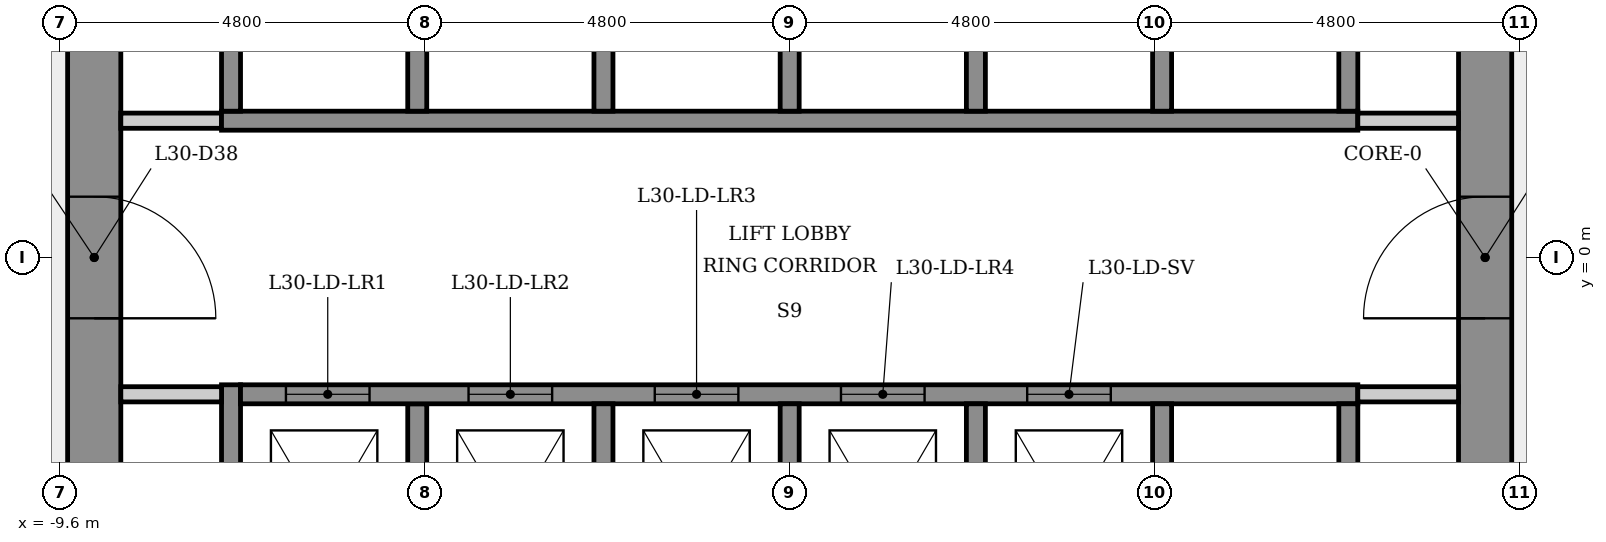
"""IFC4 building model, lengths in metres.
Left out: names, types, materials, properties, quantities, classifications, styles, units other than length and angle.
Written with IfcOpenShell. Run it as: python <this file> out.ifc"""

import sys

from ifc_helpers import new_model, si_unit, direction, frame, frame_2d, origin, place, context, subcontext, project, spatial, rectangle, extrude, element, fill, save


model = new_model("IFC4")
c1 = context("Model", 3, precision=1e-05, world=origin(), true_north=direction((0.0, 1.0)))
c2 = subcontext(c1, "Body", "Model", "MODEL_VIEW")
j1 = project(units=[si_unit("LENGTHUNIT", "METRE"), si_unit("PLANEANGLEUNIT", "RADIAN")], contexts=[c1])
p1 = place(None, origin())
s1 = spatial("IfcSite", under=j1, at=p1, CompositionType="ELEMENT")
p2 = place(p1, origin())
s2 = spatial("IfcBuilding", under=s1, at=p2, CompositionType="ELEMENT")
p3 = place(p2, frame((0.0, 0.0, 113.7)))
s3 = spatial("IfcBuildingStorey", under=s2, at=p3, CompositionType="ELEMENT", Elevation=113.7)
p4 = place(p3, frame((9.15, -5.485, 0.0), z_axis=(0.0, 0.0, 1.0), x_axis=(0.0, 1.0, 0.0)))
e1 = element("IfcWall", 1, at=p4, inside=s3, PredefinedType="SHEAR", context=c2, shape_type="SweptSolid", body=[
    extrude(rectangle(XDim=10.97, YDim=0.7, at=frame_2d((5.485, 0.0))), origin(), (0.0, 0.0, 1.0), 3.4),
])
p5 = place(p4, frame((4.685, 0.0, 0.0)))
e2 = element("IfcOpeningElement", 2, at=p5, cuts=e1, PredefinedType="OPENING", context=c2, shape_type="SweptSolid", body=[
    extrude(rectangle(XDim=1.6, YDim=2.1, at=frame_2d((0.8, 1.05))), frame((0.0, 0.36, 0.0), z_axis=(0.0, -1.0, 0.0), x_axis=(1.0, 0.0, 0.0)), (0.0, 0.0, 1.0), 0.72),
])
p6 = place(p3, frame((-9.15, 5.485, 0.0), z_axis=(0.0, 0.0, 1.0), x_axis=(0.0, -1.0, 0.0)))
e3 = element("IfcWall", 3, at=p6, inside=s3, PredefinedType="SHEAR", context=c2, shape_type="SweptSolid", body=[
    extrude(rectangle(XDim=10.97, YDim=0.7, at=frame_2d((5.485, 0.0))), origin(), (0.0, 0.0, 1.0), 3.4),
])
p7 = place(p6, frame((4.685, 0.0, 0.0)))
e4 = element("IfcOpeningElement", 4, at=p7, cuts=e3, PredefinedType="OPENING", context=c2, shape_type="SweptSolid", body=[
    extrude(rectangle(XDim=1.6, YDim=2.1, at=frame_2d((0.8, 1.05))), frame((0.0, 0.36, 0.0), z_axis=(0.0, -1.0, 0.0), x_axis=(1.0, 0.0, 0.0)), (0.0, 0.0, 1.0), 0.72),
])
p8 = place(p3, frame((-8.8, 1.8, 0.0), z_axis=(0.0, 0.0, 1.0), x_axis=(1.0, 0.0, 0.0)))
e5 = element("IfcWall", 5, at=p8, inside=s3, PredefinedType="PARTITIONING", context=c2, shape_type="SweptSolid", body=[
    extrude(rectangle(XDim=1.325, YDim=0.2, at=frame_2d((0.663, 0.0))), origin(), (0.0, 0.0, 1.0), 3.05),
])
p9 = place(p3, frame((-7.475, 1.8, 0.0), z_axis=(0.0, 0.0, 1.0), x_axis=(1.0, 0.0, 0.0)))
e6 = element("IfcWall", 6, at=p9, inside=s3, PredefinedType="SHEAR", context=c2, shape_type="SweptSolid", body=[
    extrude(rectangle(XDim=14.95, YDim=0.25, at=frame_2d((7.475, 0.0))), origin(), (0.0, 0.0, 1.0), 3.05),
])
p10 = place(p3, frame((-7.35, -5.846, 0.0), z_axis=(0.0, 0.0, 1.0), x_axis=(0.0, 1.0, 0.0)))
e7 = element("IfcWall", 7, at=p10, inside=s3, PredefinedType="SHEAR", context=c2, shape_type="SweptSolid", body=[
    extrude(rectangle(XDim=4.171, YDim=0.25, at=frame_2d((2.085, 0.0))), origin(), (0.0, 0.0, 1.0), 3.05),
])
p11 = place(p3, frame((-7.35, 1.925, 0.0), z_axis=(0.0, 0.0, 1.0), x_axis=(0.0, 1.0, 0.0)))
e8 = element("IfcWall", 8, at=p11, inside=s3, PredefinedType="SHEAR", context=c2, shape_type="SweptSolid", body=[
    extrude(rectangle(XDim=3.921, YDim=0.25, at=frame_2d((1.96, 0.0))), origin(), (0.0, 0.0, 1.0), 3.05),
])
p12 = place(p3, frame((-7.475, -1.8, 0.0), z_axis=(0.0, 0.0, 1.0), x_axis=(-1.0, 0.0, 0.0)))
e9 = element("IfcWall", 9, at=p12, inside=s3, PredefinedType="PARTITIONING", context=c2, shape_type="SweptSolid", body=[
    extrude(rectangle(XDim=1.325, YDim=0.2, at=frame_2d((0.663, 0.0))), origin(), (0.0, 0.0, 1.0), 3.05),
])
for number, where, z_axis, x_axis in (
    (10, (-4.9, -1.925, 0.0), (0.0, 0.0, 1.0), (0.0, -1.0, 0.0)),
    (11, (-4.9, 5.025, 0.0), (0.0, 0.0, 1.0), (0.0, -1.0, 0.0)),
):
    element("IfcWall", number, at=place(p3, frame(where, z_axis=z_axis, x_axis=x_axis)), inside=s3, PredefinedType="SHEAR", context=c2, shape_type="SweptSolid", body=[
        extrude(rectangle(XDim=3.1, YDim=0.25, at=frame_2d((1.55, 0.0))), origin(), (0.0, 0.0, 1.0), 3.4),
    ])
p13 = place(p3, frame((-7.225, -1.8, 0.0), z_axis=(0.0, 0.0, 1.0), x_axis=(1.0, 0.0, 0.0)))
e12 = element("IfcWall", 12, at=p13, inside=s3, PredefinedType="SHEAR", context=c2, shape_type="SweptSolid", body=[
    extrude(rectangle(XDim=14.7, YDim=0.25, at=frame_2d((7.35, 0.0))), origin(), (0.0, 0.0, 1.0), 3.05),
])
p14 = place(p13, frame((0.597, 0.0, 0.0)))
e13 = element("IfcOpeningElement", 13, at=p14, cuts=e12, PredefinedType="OPENING", context=c2, shape_type="SweptSolid", body=[
    extrude(rectangle(XDim=1.1, YDim=2.1, at=frame_2d((0.55, 1.05))), frame((0.0, 0.135, 0.0), z_axis=(0.0, -1.0, 0.0), x_axis=(1.0, 0.0, 0.0)), (0.0, 0.0, 1.0), 0.27),
])
p15 = place(p13, frame((3.0, 0.0, 0.0)))
e14 = element("IfcOpeningElement", 14, at=p15, cuts=e12, PredefinedType="OPENING", context=c2, shape_type="SweptSolid", body=[
    extrude(rectangle(XDim=1.1, YDim=2.1, at=frame_2d((0.55, 1.05))), frame((0.0, 0.135, 0.0), z_axis=(0.0, -1.0, 0.0), x_axis=(1.0, 0.0, 0.0)), (0.0, 0.0, 1.0), 0.27),
])
p16 = place(p13, frame((5.45, 0.0, 0.0)))
e15 = element("IfcOpeningElement", 15, at=p16, cuts=e12, PredefinedType="OPENING", context=c2, shape_type="SweptSolid", body=[
    extrude(rectangle(XDim=1.1, YDim=2.1, at=frame_2d((0.55, 1.05))), frame((0.0, 0.135, 0.0), z_axis=(0.0, -1.0, 0.0), x_axis=(1.0, 0.0, 0.0)), (0.0, 0.0, 1.0), 0.27),
])
p17 = place(p13, frame((7.9, 0.0, 0.0)))
e16 = element("IfcOpeningElement", 16, at=p17, cuts=e12, PredefinedType="OPENING", context=c2, shape_type="SweptSolid", body=[
    extrude(rectangle(XDim=1.1, YDim=2.1, at=frame_2d((0.55, 1.05))), frame((0.0, 0.135, 0.0), z_axis=(0.0, -1.0, 0.0), x_axis=(1.0, 0.0, 0.0)), (0.0, 0.0, 1.0), 0.27),
])
p18 = place(p13, frame((10.35, 0.0, 0.0)))
e17 = element("IfcOpeningElement", 17, at=p18, cuts=e12, PredefinedType="OPENING", context=c2, shape_type="SweptSolid", body=[
    extrude(rectangle(XDim=1.1, YDim=2.1, at=frame_2d((0.55, 1.05))), frame((0.0, 0.135, 0.0), z_axis=(0.0, -1.0, 0.0), x_axis=(1.0, 0.0, 0.0)), (0.0, 0.0, 1.0), 0.27),
])
for number, where, z_axis, x_axis in (
    (18, (-2.45, -1.925, 0.0), (0.0, 0.0, 1.0), (0.0, -1.0, 0.0)),
    (19, (-2.45, 5.025, 0.0), (0.0, 0.0, 1.0), (0.0, -1.0, 0.0)),
    (20, (0.0, -1.925, 0.0), (0.0, 0.0, 1.0), (0.0, -1.0, 0.0)),
    (21, (0.0, 5.025, 0.0), (0.0, 0.0, 1.0), (0.0, -1.0, 0.0)),
    (22, (2.45, -1.925, 0.0), (0.0, 0.0, 1.0), (0.0, -1.0, 0.0)),
    (23, (2.45, 5.025, 0.0), (0.0, 0.0, 1.0), (0.0, -1.0, 0.0)),
    (24, (4.9, -1.925, 0.0), (0.0, 0.0, 1.0), (0.0, -1.0, 0.0)),
    (25, (4.9, 5.025, 0.0), (0.0, 0.0, 1.0), (0.0, -1.0, 0.0)),
):
    element("IfcWall", number, at=place(p3, frame(where, z_axis=z_axis, x_axis=x_axis)), inside=s3, PredefinedType="SHEAR", context=c2, shape_type="SweptSolid", body=[
        extrude(rectangle(XDim=3.1, YDim=0.25, at=frame_2d((1.55, 0.0))), origin(), (0.0, 0.0, 1.0), 3.4),
    ])
p19 = place(p3, frame((7.475, 1.8, 0.0), z_axis=(0.0, 0.0, 1.0), x_axis=(1.0, 0.0, 0.0)))
e26 = element("IfcWall", 26, at=p19, inside=s3, PredefinedType="PARTITIONING", context=c2, shape_type="SweptSolid", body=[
    extrude(rectangle(XDim=1.325, YDim=0.2, at=frame_2d((0.663, 0.0))), origin(), (0.0, 0.0, 1.0), 3.05),
])
for number, where, z_axis, x_axis in (
    (27, (7.35, -1.925, 0.0), (0.0, 0.0, 1.0), (0.0, -1.0, 0.0)),
    (28, (7.35, 5.025, 0.0), (0.0, 0.0, 1.0), (0.0, -1.0, 0.0)),
):
    element("IfcWall", number, at=place(p3, frame(where, z_axis=z_axis, x_axis=x_axis)), inside=s3, PredefinedType="SHEAR", context=c2, shape_type="SweptSolid", body=[
        extrude(rectangle(XDim=3.1, YDim=0.25, at=frame_2d((1.55, 0.0))), origin(), (0.0, 0.0, 1.0), 3.4),
    ])
p20 = place(p3, frame((8.8, -1.8, 0.0), z_axis=(0.0, 0.0, 1.0), x_axis=(-1.0, 0.0, 0.0)))
e29 = element("IfcWall", 29, at=p20, inside=s3, PredefinedType="PARTITIONING", context=c2, shape_type="SweptSolid", body=[
    extrude(rectangle(XDim=1.325, YDim=0.2, at=frame_2d((0.663, 0.0))), origin(), (0.0, 0.0, 1.0), 3.05),
])
p21 = place(p14, origin())
e30 = element("IfcDoor", 30, at=p21, inside=s3, OperationType="SLIDING_TO_LEFT", PredefinedType="DOOR", context=c2, shape_type="SweptSolid", body=[
    extrude(rectangle(XDim=1.1, YDim=2.1, at=frame_2d((0.55, 1.05))), frame((0.0, 0.025, 0.0), z_axis=(0.0, -1.0, 0.0), x_axis=(1.0, 0.0, 0.0)), (0.0, 0.0, 1.0), 0.05),
])
fill(e13, e30)
p22 = place(p15, origin())
e31 = element("IfcDoor", 31, at=p22, inside=s3, OperationType="SLIDING_TO_LEFT", PredefinedType="DOOR", context=c2, shape_type="SweptSolid", body=[
    extrude(rectangle(XDim=1.1, YDim=2.1, at=frame_2d((0.55, 1.05))), frame((0.0, 0.025, 0.0), z_axis=(0.0, -1.0, 0.0), x_axis=(1.0, 0.0, 0.0)), (0.0, 0.0, 1.0), 0.05),
])
fill(e14, e31)
p23 = place(p16, origin())
e32 = element("IfcDoor", 32, at=p23, inside=s3, OperationType="SLIDING_TO_LEFT", PredefinedType="DOOR", context=c2, shape_type="SweptSolid", body=[
    extrude(rectangle(XDim=1.1, YDim=2.1, at=frame_2d((0.55, 1.05))), frame((0.0, 0.025, 0.0), z_axis=(0.0, -1.0, 0.0), x_axis=(1.0, 0.0, 0.0)), (0.0, 0.0, 1.0), 0.05),
])
fill(e15, e32)
p24 = place(p17, origin())
e33 = element("IfcDoor", 33, at=p24, inside=s3, OperationType="SLIDING_TO_LEFT", PredefinedType="DOOR", context=c2, shape_type="SweptSolid", body=[
    extrude(rectangle(XDim=1.1, YDim=2.1, at=frame_2d((0.55, 1.05))), frame((0.0, 0.025, 0.0), z_axis=(0.0, -1.0, 0.0), x_axis=(1.0, 0.0, 0.0)), (0.0, 0.0, 1.0), 0.05),
])
fill(e16, e33)
p25 = place(p18, origin())
e34 = element("IfcDoor", 34, at=p25, inside=s3, OperationType="SLIDING_TO_LEFT", PredefinedType="DOOR", context=c2, shape_type="SweptSolid", body=[
    extrude(rectangle(XDim=1.1, YDim=2.1, at=frame_2d((0.55, 1.05))), frame((0.0, 0.025, 0.0), z_axis=(0.0, -1.0, 0.0), x_axis=(1.0, 0.0, 0.0)), (0.0, 0.0, 1.0), 0.05),
])
fill(e17, e34)
p26 = place(p5, origin())
e35 = element("IfcDoor", 35, at=p26, inside=s3, OperationType="SINGLE_SWING_LEFT", PredefinedType="DOOR", context=c2, shape_type="SweptSolid", body=[
    extrude(rectangle(XDim=1.6, YDim=2.1, at=frame_2d((0.8, 1.05))), frame((0.0, 0.025, 0.0), z_axis=(0.0, -1.0, 0.0), x_axis=(1.0, 0.0, 0.0)), (0.0, 0.0, 1.0), 0.05),
])
fill(e2, e35)
p27 = place(p7, origin())
e36 = element("IfcDoor", 36, at=p27, inside=s3, OperationType="SINGLE_SWING_RIGHT", PredefinedType="DOOR", context=c2, shape_type="SweptSolid", body=[
    extrude(rectangle(XDim=1.6, YDim=2.1, at=frame_2d((0.8, 1.05))), frame((0.0, 0.025, 0.0), z_axis=(0.0, -1.0, 0.0), x_axis=(1.0, 0.0, 0.0)), (0.0, 0.0, 1.0), 0.05),
])
fill(e4, e36)
save(model, sys.argv[1])
